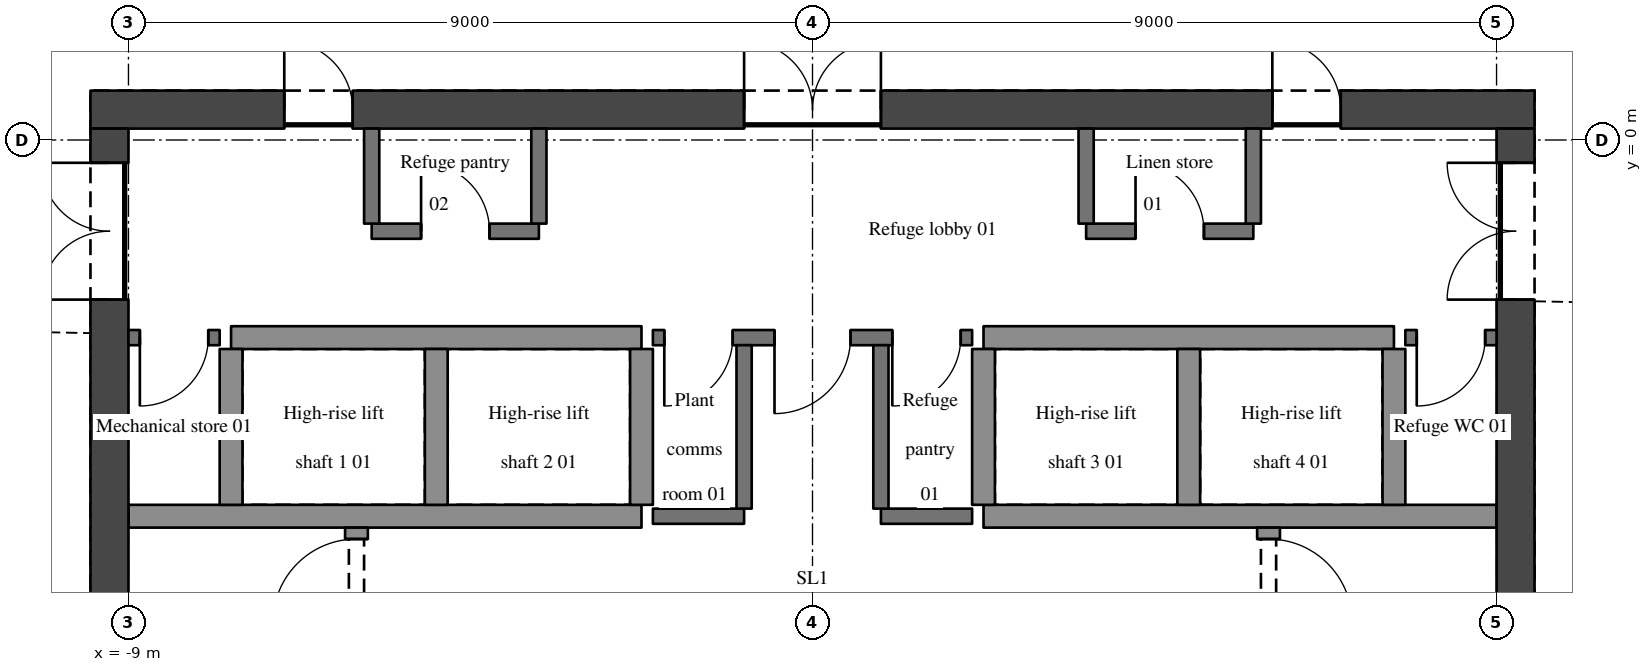
"""IFC4 building model, lengths in metres.
Left out: names, types, materials, properties, quantities, classifications, styles, units other than length and angle.
Written with IfcOpenShell. Run it as: python <this file> out.ifc"""

import sys

from ifc_helpers import new_model, si_unit, direction, frame, frame_2d, origin, place, context, subcontext, project, spatial, rectangle, extrude, element, fill, save


model = new_model("IFC4")
c1 = context("Model", 3, precision=1e-05, world=origin(), true_north=direction((0.0, 1.0)))
c2 = subcontext(c1, "Body", "Model", "MODEL_VIEW")
j1 = project(units=[si_unit("LENGTHUNIT", "METRE"), si_unit("PLANEANGLEUNIT", "RADIAN")], contexts=[c1])
p1 = place(None, origin())
s1 = spatial("IfcSite", under=j1, at=p1, CompositionType="ELEMENT")
p2 = place(p1, origin())
s2 = spatial("IfcBuilding", under=s1, at=p2, CompositionType="ELEMENT")
p3 = place(p2, frame((0.0, 0.0, 255.0)))
s3 = spatial("IfcBuildingStorey", under=s2, at=p3, CompositionType="ELEMENT", Elevation=255.0)
p4 = place(p3, frame((-9.5, 0.4, 0.0), z_axis=(0.0, 0.0, 1.0), x_axis=(1.0, 0.0, 0.0)))
e1 = element("IfcWall", 1, at=p4, inside=s3, PredefinedType="SHEAR", context=c2, shape_type="SweptSolid", body=[
    extrude(rectangle(XDim=19.0, YDim=0.5, at=frame_2d((9.5, 0.0))), origin(), (0.0, 0.0, 1.0), 4.5),
])
p5 = place(p4, frame((8.6, 0.0, 0.0)))
e2 = element("IfcOpeningElement", 2, at=p5, cuts=e1, PredefinedType="OPENING", context=c2, shape_type="SweptSolid", body=[
    extrude(rectangle(XDim=1.8, YDim=2.1, at=frame_2d((0.9, 1.05))), frame((0.0, 0.26, 0.0), z_axis=(0.0, -1.0, 0.0), x_axis=(1.0, 0.0, 0.0)), (0.0, 0.0, 1.0), 0.52),
])
p6 = place(p4, frame((2.55, 0.0, 0.0)))
e3 = element("IfcOpeningElement", 3, at=p6, cuts=e1, PredefinedType="OPENING", context=c2, shape_type="SweptSolid", body=[
    extrude(rectangle(XDim=0.9, YDim=2.1, at=frame_2d((0.45, 1.05))), frame((0.0, 0.26, 0.0), z_axis=(0.0, -1.0, 0.0), x_axis=(1.0, 0.0, 0.0)), (0.0, 0.0, 1.0), 0.52),
])
p7 = place(p4, frame((15.55, 0.0, 0.0)))
e4 = element("IfcOpeningElement", 4, at=p7, cuts=e1, PredefinedType="OPENING", context=c2, shape_type="SweptSolid", body=[
    extrude(rectangle(XDim=0.9, YDim=2.1, at=frame_2d((0.45, 1.05))), frame((0.0, 0.26, 0.0), z_axis=(0.0, -1.0, 0.0), x_axis=(1.0, 0.0, 0.0)), (0.0, 0.0, 1.0), 0.52),
])
p8 = place(p3, frame((-9.25, -11.5, 0.0), z_axis=(0.0, 0.0, 1.0), x_axis=(0.0, 1.0, 0.0)))
e5 = element("IfcWall", 5, at=p8, inside=s3, PredefinedType="SHEAR", context=c2, shape_type="SweptSolid", body=[
    extrude(rectangle(XDim=11.65, YDim=0.5, at=frame_2d((5.825, 0.0))), origin(), (0.0, 0.0, 1.0), 4.5),
])
p9 = place(p8, frame((9.4, 0.0, 0.0)))
e6 = element("IfcOpeningElement", 6, at=p9, cuts=e5, PredefinedType="OPENING", context=c2, shape_type="SweptSolid", body=[
    extrude(rectangle(XDim=1.8, YDim=2.1, at=frame_2d((0.9, 1.05))), frame((0.0, 0.26, 0.0), z_axis=(0.0, -1.0, 0.0), x_axis=(1.0, 0.0, 0.0)), (0.0, 0.0, 1.0), 0.52),
])
p10 = place(p3, frame((9.25, -11.5, 0.0), z_axis=(0.0, 0.0, 1.0), x_axis=(0.0, 1.0, 0.0)))
e7 = element("IfcWall", 7, at=p10, inside=s3, PredefinedType="SHEAR", context=c2, shape_type="SweptSolid", body=[
    extrude(rectangle(XDim=11.65, YDim=0.5, at=frame_2d((5.825, 0.0))), origin(), (0.0, 0.0, 1.0), 4.5),
])
p11 = place(p10, frame((9.4, 0.0, 0.0)))
e8 = element("IfcOpeningElement", 8, at=p11, cuts=e7, PredefinedType="OPENING", context=c2, shape_type="SweptSolid", body=[
    extrude(rectangle(XDim=1.8, YDim=2.1, at=frame_2d((0.9, 1.05))), frame((0.0, 0.26, 0.0), z_axis=(0.0, -1.0, 0.0), x_axis=(1.0, 0.0, 0.0)), (0.0, 0.0, 1.0), 0.52),
])
p12 = place(p3, frame((-9.0, -4.95, 0.0), z_axis=(0.0, 0.0, 1.0), x_axis=(1.0, 0.0, 0.0)))
e9 = element("IfcWall", 9, at=p12, inside=s3, PredefinedType="SHEAR", context=c2, shape_type="SweptSolid", body=[
    extrude(rectangle(XDim=6.75, YDim=0.3, at=frame_2d((3.375, 0.0))), origin(), (0.0, 0.0, 1.0), 4.5),
])
for number, where, z_axis, x_axis in (
    (10, (-2.1, -4.95, 0.0), (0.0, 0.0, 1.0), (1.0, 0.0, 0.0)),
    (11, (0.9, -4.95, 0.0), (0.0, 0.0, 1.0), (1.0, 0.0, 0.0)),
):
    element("IfcWall", number, at=place(p3, frame(where, z_axis=z_axis, x_axis=x_axis)), inside=s3, PredefinedType="SOLIDWALL", context=c2, shape_type="SweptSolid", body=[
        extrude(rectangle(XDim=1.2, YDim=0.2, at=frame_2d((0.6, 0.0))), origin(), (0.0, 0.0, 1.0), 4.2),
    ])
p13 = place(p3, frame((2.25, -4.95, 0.0), z_axis=(0.0, 0.0, 1.0), x_axis=(1.0, 0.0, 0.0)))
e12 = element("IfcWall", 12, at=p13, inside=s3, PredefinedType="SHEAR", context=c2, shape_type="SweptSolid", body=[
    extrude(rectangle(XDim=6.75, YDim=0.3, at=frame_2d((3.375, 0.0))), origin(), (0.0, 0.0, 1.0), 4.5),
])
p14 = place(p3, frame((-7.8, -2.6, 0.0), z_axis=(0.0, 0.0, 1.0), x_axis=(-1.0, 0.0, 0.0)))
e13 = element("IfcWall", 13, at=p14, inside=s3, PredefinedType="SOLIDWALL", context=c2, shape_type="SweptSolid", body=[
    extrude(rectangle(XDim=1.2, YDim=0.2, at=frame_2d((0.6, 0.0))), origin(), (0.0, 0.0, 1.0), 4.2),
])
p15 = place(p14, frame((0.15, 0.0, 0.0)))
e14 = element("IfcOpeningElement", 14, at=p15, cuts=e13, PredefinedType="OPENING", context=c2, shape_type="SweptSolid", body=[
    extrude(rectangle(XDim=0.9, YDim=2.1, at=frame_2d((0.45, 1.05))), frame((0.0, 0.11, 0.0), z_axis=(0.0, -1.0, 0.0), x_axis=(1.0, 0.0, 0.0)), (0.0, 0.0, 1.0), 0.22),
])
p16 = place(p3, frame((-7.65, -2.6, 0.0), z_axis=(0.0, 0.0, 1.0), x_axis=(1.0, 0.0, 0.0)))
e15 = element("IfcWall", 15, at=p16, inside=s3, PredefinedType="SHEAR", context=c2, shape_type="SweptSolid", body=[
    extrude(rectangle(XDim=5.4, YDim=0.3, at=frame_2d((2.7, 0.0))), origin(), (0.0, 0.0, 1.0), 4.5),
])
p17 = place(p3, frame((2.1, -2.6, 0.0), z_axis=(0.0, 0.0, 1.0), x_axis=(-1.0, 0.0, 0.0)))
e16 = element("IfcWall", 16, at=p17, inside=s3, PredefinedType="SOLIDWALL", context=c2, shape_type="SweptSolid", body=[
    extrude(rectangle(XDim=4.2, YDim=0.2, at=frame_2d((2.1, 0.0))), origin(), (0.0, 0.0, 1.0), 4.2),
])
p18 = place(p17, frame((1.6, 0.0, 0.0)))
e17 = element("IfcOpeningElement", 17, at=p18, cuts=e16, PredefinedType="OPENING", context=c2, shape_type="SweptSolid", body=[
    extrude(rectangle(XDim=1.0, YDim=2.1, at=frame_2d((0.5, 1.05))), frame((0.0, 0.11, 0.0), z_axis=(0.0, -1.0, 0.0), x_axis=(1.0, 0.0, 0.0)), (0.0, 0.0, 1.0), 0.22),
])
p19 = place(p17, frame((3.15, 0.0, 0.0)))
e18 = element("IfcOpeningElement", 18, at=p19, cuts=e16, PredefinedType="OPENING", context=c2, shape_type="SweptSolid", body=[
    extrude(rectangle(XDim=0.9, YDim=2.1, at=frame_2d((0.45, 1.05))), frame((0.0, 0.11, 0.0), z_axis=(0.0, -1.0, 0.0), x_axis=(1.0, 0.0, 0.0)), (0.0, 0.0, 1.0), 0.22),
])
p20 = place(p17, frame((0.15, 0.0, 0.0)))
e19 = element("IfcOpeningElement", 19, at=p20, cuts=e16, PredefinedType="OPENING", context=c2, shape_type="SweptSolid", body=[
    extrude(rectangle(XDim=0.9, YDim=2.1, at=frame_2d((0.45, 1.05))), frame((0.0, 0.11, 0.0), z_axis=(0.0, -1.0, 0.0), x_axis=(1.0, 0.0, 0.0)), (0.0, 0.0, 1.0), 0.22),
])
p21 = place(p3, frame((2.25, -2.6, 0.0), z_axis=(0.0, 0.0, 1.0), x_axis=(1.0, 0.0, 0.0)))
e20 = element("IfcWall", 20, at=p21, inside=s3, PredefinedType="SHEAR", context=c2, shape_type="SweptSolid", body=[
    extrude(rectangle(XDim=5.4, YDim=0.3, at=frame_2d((2.7, 0.0))), origin(), (0.0, 0.0, 1.0), 4.5),
])
p22 = place(p3, frame((9.0, -2.6, 0.0), z_axis=(0.0, 0.0, 1.0), x_axis=(-1.0, 0.0, 0.0)))
e21 = element("IfcWall", 21, at=p22, inside=s3, PredefinedType="SOLIDWALL", context=c2, shape_type="SweptSolid", body=[
    extrude(rectangle(XDim=1.2, YDim=0.2, at=frame_2d((0.6, 0.0))), origin(), (0.0, 0.0, 1.0), 4.2),
])
p23 = place(p22, frame((0.15, 0.0, 0.0)))
e22 = element("IfcOpeningElement", 22, at=p23, cuts=e21, PredefinedType="OPENING", context=c2, shape_type="SweptSolid", body=[
    extrude(rectangle(XDim=0.9, YDim=2.1, at=frame_2d((0.45, 1.05))), frame((0.0, 0.11, 0.0), z_axis=(0.0, -1.0, 0.0), x_axis=(1.0, 0.0, 0.0)), (0.0, 0.0, 1.0), 0.22),
])
p24 = place(p3, frame((-5.8, -1.2, 0.0), z_axis=(0.0, 0.0, 1.0), x_axis=(1.0, 0.0, 0.0)))
e23 = element("IfcWall", 23, at=p24, inside=s3, PredefinedType="SOLIDWALL", context=c2, shape_type="SweptSolid", body=[
    extrude(rectangle(XDim=2.2, YDim=0.2, at=frame_2d((1.1, 0.0))), origin(), (0.0, 0.0, 1.0), 4.2),
])
p25 = place(p24, frame((0.65, 0.0, 0.0)))
e24 = element("IfcOpeningElement", 24, at=p25, cuts=e23, PredefinedType="OPENING", context=c2, shape_type="SweptSolid", body=[
    extrude(rectangle(XDim=0.9, YDim=2.1, at=frame_2d((0.45, 1.05))), frame((0.0, 0.11, 0.0), z_axis=(0.0, -1.0, 0.0), x_axis=(1.0, 0.0, 0.0)), (0.0, 0.0, 1.0), 0.22),
])
p26 = place(p3, frame((3.6, -1.2, 0.0), z_axis=(0.0, 0.0, 1.0), x_axis=(1.0, 0.0, 0.0)))
e25 = element("IfcWall", 25, at=p26, inside=s3, PredefinedType="SOLIDWALL", context=c2, shape_type="SweptSolid", body=[
    extrude(rectangle(XDim=2.2, YDim=0.2, at=frame_2d((1.1, 0.0))), origin(), (0.0, 0.0, 1.0), 4.2),
])
p27 = place(p26, frame((0.65, 0.0, 0.0)))
e26 = element("IfcOpeningElement", 26, at=p27, cuts=e25, PredefinedType="OPENING", context=c2, shape_type="SweptSolid", body=[
    extrude(rectangle(XDim=0.9, YDim=2.1, at=frame_2d((0.45, 1.05))), frame((0.0, 0.11, 0.0), z_axis=(0.0, -1.0, 0.0), x_axis=(1.0, 0.0, 0.0)), (0.0, 0.0, 1.0), 0.22),
])
p28 = place(p3, frame((-7.65, -4.8, 0.0), z_axis=(0.0, 0.0, 1.0), x_axis=(0.0, 1.0, 0.0)))
e27 = element("IfcWall", 27, at=p28, inside=s3, PredefinedType="SHEAR", context=c2, shape_type="SweptSolid", body=[
    extrude(rectangle(XDim=2.05, YDim=0.3, at=frame_2d((1.025, 0.0))), origin(), (0.0, 0.0, 1.0), 4.5),
])
p29 = place(p3, frame((-6.0, -11.5, 0.0), z_axis=(0.0, 0.0, 1.0), x_axis=(0.0, 1.0, 0.0)))
e28 = element("IfcWall", 28, at=p29, inside=s3, PredefinedType="SHEAR", context=c2, shape_type="SweptSolid", body=[
    extrude(rectangle(XDim=6.4, YDim=0.3, at=frame_2d((3.2, 0.0))), origin(), (0.0, 0.0, 1.0), 4.5),
])
p30 = place(p29, frame((5.15, 0.0, 0.0)))
e29 = element("IfcOpeningElement", 29, at=p30, cuts=e28, PredefinedType="OPENING", context=c2, shape_type="SweptSolid", body=[
    extrude(rectangle(XDim=1.1, YDim=2.1, at=frame_2d((0.55, 1.05))), frame((0.0, 0.16, 0.0), z_axis=(0.0, -1.0, 0.0), x_axis=(1.0, 0.0, 0.0)), (0.0, 0.0, 1.0), 0.32),
])
p31 = place(p3, frame((-5.8, -1.1, 0.0), z_axis=(0.0, 0.0, 1.0), x_axis=(0.0, 1.0, 0.0)))
e30 = element("IfcWall", 30, at=p31, inside=s3, PredefinedType="SOLIDWALL", context=c2, shape_type="SweptSolid", body=[
    extrude(rectangle(XDim=1.25, YDim=0.2, at=frame_2d((0.625, 0.0))), origin(), (0.0, 0.0, 1.0), 4.2),
])
p32 = place(p3, frame((-4.95, -4.8, 0.0), z_axis=(0.0, 0.0, 1.0), x_axis=(0.0, 1.0, 0.0)))
e31 = element("IfcWall", 31, at=p32, inside=s3, PredefinedType="SHEAR", context=c2, shape_type="SweptSolid", body=[
    extrude(rectangle(XDim=2.05, YDim=0.3, at=frame_2d((1.025, 0.0))), origin(), (0.0, 0.0, 1.0), 4.5),
])
p33 = place(p3, frame((-3.6, -1.1, 0.0), z_axis=(0.0, 0.0, 1.0), x_axis=(0.0, 1.0, 0.0)))
e32 = element("IfcWall", 32, at=p33, inside=s3, PredefinedType="SOLIDWALL", context=c2, shape_type="SweptSolid", body=[
    extrude(rectangle(XDim=1.25, YDim=0.2, at=frame_2d((0.625, 0.0))), origin(), (0.0, 0.0, 1.0), 4.2),
])
p34 = place(p3, frame((-2.25, -4.8, 0.0), z_axis=(0.0, 0.0, 1.0), x_axis=(0.0, 1.0, 0.0)))
e33 = element("IfcWall", 33, at=p34, inside=s3, PredefinedType="SHEAR", context=c2, shape_type="SweptSolid", body=[
    extrude(rectangle(XDim=2.05, YDim=0.3, at=frame_2d((1.025, 0.0))), origin(), (0.0, 0.0, 1.0), 4.5),
])
for number, where, z_axis, x_axis in (
    (34, (-0.9, -4.85, 0.0), (0.0, 0.0, 1.0), (0.0, 1.0, 0.0)),
    (35, (0.9, -4.85, 0.0), (0.0, 0.0, 1.0), (0.0, 1.0, 0.0)),
):
    element("IfcWall", number, at=place(p3, frame(where, z_axis=z_axis, x_axis=x_axis)), inside=s3, PredefinedType="SOLIDWALL", context=c2, shape_type="SweptSolid", body=[
        extrude(rectangle(XDim=2.15, YDim=0.2, at=frame_2d((1.075, 0.0))), origin(), (0.0, 0.0, 1.0), 4.2),
    ])
p35 = place(p3, frame((2.25, -4.8, 0.0), z_axis=(0.0, 0.0, 1.0), x_axis=(0.0, 1.0, 0.0)))
e36 = element("IfcWall", 36, at=p35, inside=s3, PredefinedType="SHEAR", context=c2, shape_type="SweptSolid", body=[
    extrude(rectangle(XDim=2.05, YDim=0.3, at=frame_2d((1.025, 0.0))), origin(), (0.0, 0.0, 1.0), 4.5),
])
p36 = place(p3, frame((3.6, -1.1, 0.0), z_axis=(0.0, 0.0, 1.0), x_axis=(0.0, 1.0, 0.0)))
e37 = element("IfcWall", 37, at=p36, inside=s3, PredefinedType="SOLIDWALL", context=c2, shape_type="SweptSolid", body=[
    extrude(rectangle(XDim=1.25, YDim=0.2, at=frame_2d((0.625, 0.0))), origin(), (0.0, 0.0, 1.0), 4.2),
])
p37 = place(p3, frame((4.95, -4.8, 0.0), z_axis=(0.0, 0.0, 1.0), x_axis=(0.0, 1.0, 0.0)))
e38 = element("IfcWall", 38, at=p37, inside=s3, PredefinedType="SHEAR", context=c2, shape_type="SweptSolid", body=[
    extrude(rectangle(XDim=2.05, YDim=0.3, at=frame_2d((1.025, 0.0))), origin(), (0.0, 0.0, 1.0), 4.5),
])
p38 = place(p3, frame((5.8, -1.1, 0.0), z_axis=(0.0, 0.0, 1.0), x_axis=(0.0, 1.0, 0.0)))
e39 = element("IfcWall", 39, at=p38, inside=s3, PredefinedType="SOLIDWALL", context=c2, shape_type="SweptSolid", body=[
    extrude(rectangle(XDim=1.25, YDim=0.2, at=frame_2d((0.625, 0.0))), origin(), (0.0, 0.0, 1.0), 4.2),
])
p39 = place(p3, frame((6.0, -5.1, 0.0), z_axis=(0.0, 0.0, 1.0), x_axis=(0.0, -1.0, 0.0)))
e40 = element("IfcWall", 40, at=p39, inside=s3, PredefinedType="SHEAR", context=c2, shape_type="SweptSolid", body=[
    extrude(rectangle(XDim=6.4, YDim=0.3, at=frame_2d((3.2, 0.0))), origin(), (0.0, 0.0, 1.0), 4.5),
])
p40 = place(p39, frame((0.15, 0.0, 0.0)))
e41 = element("IfcOpeningElement", 41, at=p40, cuts=e40, PredefinedType="OPENING", context=c2, shape_type="SweptSolid", body=[
    extrude(rectangle(XDim=1.1, YDim=2.1, at=frame_2d((0.55, 1.05))), frame((0.0, 0.16, 0.0), z_axis=(0.0, -1.0, 0.0), x_axis=(1.0, 0.0, 0.0)), (0.0, 0.0, 1.0), 0.32),
])
p41 = place(p3, frame((7.65, -4.8, 0.0), z_axis=(0.0, 0.0, 1.0), x_axis=(0.0, 1.0, 0.0)))
e42 = element("IfcWall", 42, at=p41, inside=s3, PredefinedType="SHEAR", context=c2, shape_type="SweptSolid", body=[
    extrude(rectangle(XDim=2.05, YDim=0.3, at=frame_2d((1.025, 0.0))), origin(), (0.0, 0.0, 1.0), 4.5),
])
p42 = place(p9, origin())
e43 = element("IfcDoor", 43, at=p42, inside=s3, OperationType="DOUBLE_DOOR_SINGLE_SWING", PredefinedType="DOOR", context=c2, shape_type="SweptSolid", body=[
    extrude(rectangle(XDim=1.8, YDim=2.1, at=frame_2d((0.9, 1.05))), frame((0.0, 0.025, 0.0), z_axis=(0.0, -1.0, 0.0), x_axis=(1.0, 0.0, 0.0)), (0.0, 0.0, 1.0), 0.05),
])
fill(e6, e43)
p43 = place(p5, origin())
e44 = element("IfcDoor", 44, at=p43, inside=s3, OperationType="DOUBLE_DOOR_SINGLE_SWING", PredefinedType="DOOR", context=c2, shape_type="SweptSolid", body=[
    extrude(rectangle(XDim=1.8, YDim=2.1, at=frame_2d((0.9, 1.05))), frame((0.0, 0.025, 0.0), z_axis=(0.0, -1.0, 0.0), x_axis=(1.0, 0.0, 0.0)), (0.0, 0.0, 1.0), 0.05),
])
fill(e2, e44)
p44 = place(p18, origin())
e45 = element("IfcDoor", 45, at=p44, inside=s3, OperationType="SINGLE_SWING_RIGHT", PredefinedType="DOOR", context=c2, shape_type="SweptSolid", body=[
    extrude(rectangle(XDim=1.0, YDim=2.1, at=frame_2d((0.5, 1.05))), frame((0.0, 0.025, 0.0), z_axis=(0.0, -1.0, 0.0), x_axis=(1.0, 0.0, 0.0)), (0.0, 0.0, 1.0), 0.05),
])
fill(e17, e45)
p45 = place(p30, origin())
e46 = element("IfcDoor", 46, at=p45, inside=s3, OperationType="SINGLE_SWING_LEFT", PredefinedType="DOOR", context=c2, shape_type="SweptSolid", body=[
    extrude(rectangle(XDim=1.1, YDim=2.1, at=frame_2d((0.55, 1.05))), frame((0.0, 0.025, 0.0), z_axis=(0.0, -1.0, 0.0), x_axis=(1.0, 0.0, 0.0)), (0.0, 0.0, 1.0), 0.05),
])
fill(e29, e46)
p46 = place(p40, origin())
e47 = element("IfcDoor", 47, at=p46, inside=s3, OperationType="SINGLE_SWING_RIGHT", PredefinedType="DOOR", context=c2, shape_type="SweptSolid", body=[
    extrude(rectangle(XDim=1.1, YDim=2.1, at=frame_2d((0.55, 1.05))), frame((0.0, 0.025, 0.0), z_axis=(0.0, -1.0, 0.0), x_axis=(1.0, 0.0, 0.0)), (0.0, 0.0, 1.0), 0.05),
])
fill(e41, e47)
p47 = place(p19, origin())
e48 = element("IfcDoor", 48, at=p47, inside=s3, OperationType="SINGLE_SWING_RIGHT", PredefinedType="DOOR", context=c2, shape_type="SweptSolid", body=[
    extrude(rectangle(XDim=0.9, YDim=2.1, at=frame_2d((0.45, 1.05))), frame((0.0, 0.025, 0.0), z_axis=(0.0, -1.0, 0.0), x_axis=(1.0, 0.0, 0.0)), (0.0, 0.0, 1.0), 0.05),
])
fill(e18, e48)
p48 = place(p20, origin())
e49 = element("IfcDoor", 49, at=p48, inside=s3, OperationType="SINGLE_SWING_RIGHT", PredefinedType="DOOR", context=c2, shape_type="SweptSolid", body=[
    extrude(rectangle(XDim=0.9, YDim=2.1, at=frame_2d((0.45, 1.05))), frame((0.0, 0.025, 0.0), z_axis=(0.0, -1.0, 0.0), x_axis=(1.0, 0.0, 0.0)), (0.0, 0.0, 1.0), 0.05),
])
fill(e19, e49)
p49 = place(p23, origin())
e50 = element("IfcDoor", 50, at=p49, inside=s3, OperationType="SINGLE_SWING_RIGHT", PredefinedType="DOOR", context=c2, shape_type="SweptSolid", body=[
    extrude(rectangle(XDim=0.9, YDim=2.1, at=frame_2d((0.45, 1.05))), frame((0.0, 0.025, 0.0), z_axis=(0.0, -1.0, 0.0), x_axis=(1.0, 0.0, 0.0)), (0.0, 0.0, 1.0), 0.05),
])
fill(e22, e50)
p50 = place(p15, origin())
e51 = element("IfcDoor", 51, at=p50, inside=s3, OperationType="SINGLE_SWING_RIGHT", PredefinedType="DOOR", context=c2, shape_type="SweptSolid", body=[
    extrude(rectangle(XDim=0.9, YDim=2.1, at=frame_2d((0.45, 1.05))), frame((0.0, 0.025, 0.0), z_axis=(0.0, -1.0, 0.0), x_axis=(1.0, 0.0, 0.0)), (0.0, 0.0, 1.0), 0.05),
])
fill(e14, e51)
p51 = place(p6, origin())
e52 = element("IfcDoor", 52, at=p51, inside=s3, OperationType="SINGLE_SWING_LEFT", PredefinedType="DOOR", context=c2, shape_type="SweptSolid", body=[
    extrude(rectangle(XDim=0.9, YDim=2.1, at=frame_2d((0.45, 1.05))), frame((0.0, 0.025, 0.0), z_axis=(0.0, -1.0, 0.0), x_axis=(1.0, 0.0, 0.0)), (0.0, 0.0, 1.0), 0.05),
])
fill(e3, e52)
p52 = place(p7, origin())
e53 = element("IfcDoor", 53, at=p52, inside=s3, OperationType="SINGLE_SWING_LEFT", PredefinedType="DOOR", context=c2, shape_type="SweptSolid", body=[
    extrude(rectangle(XDim=0.9, YDim=2.1, at=frame_2d((0.45, 1.05))), frame((0.0, 0.025, 0.0), z_axis=(0.0, -1.0, 0.0), x_axis=(1.0, 0.0, 0.0)), (0.0, 0.0, 1.0), 0.05),
])
fill(e4, e53)
p53 = place(p25, origin())
e54 = element("IfcDoor", 54, at=p53, inside=s3, OperationType="SINGLE_SWING_LEFT", PredefinedType="DOOR", context=c2, shape_type="SweptSolid", body=[
    extrude(rectangle(XDim=0.9, YDim=2.1, at=frame_2d((0.45, 1.05))), frame((0.0, 0.025, 0.0), z_axis=(0.0, -1.0, 0.0), x_axis=(1.0, 0.0, 0.0)), (0.0, 0.0, 1.0), 0.05),
])
fill(e24, e54)
p54 = place(p27, origin())
e55 = element("IfcDoor", 55, at=p54, inside=s3, OperationType="SINGLE_SWING_LEFT", PredefinedType="DOOR", context=c2, shape_type="SweptSolid", body=[
    extrude(rectangle(XDim=0.9, YDim=2.1, at=frame_2d((0.45, 1.05))), frame((0.0, 0.025, 0.0), z_axis=(0.0, -1.0, 0.0), x_axis=(1.0, 0.0, 0.0)), (0.0, 0.0, 1.0), 0.05),
])
fill(e26, e55)
p55 = place(p11, origin())
e56 = element("IfcDoor", 56, at=p55, inside=s3, OperationType="DOUBLE_DOOR_SINGLE_SWING", PredefinedType="DOOR", context=c2, shape_type="SweptSolid", body=[
    extrude(rectangle(XDim=1.8, YDim=2.1, at=frame_2d((0.9, 1.05))), frame((0.0, 0.025, 0.0), z_axis=(0.0, -1.0, 0.0), x_axis=(1.0, 0.0, 0.0)), (0.0, 0.0, 1.0), 0.05),
])
fill(e8, e56)
save(model, sys.argv[1])
